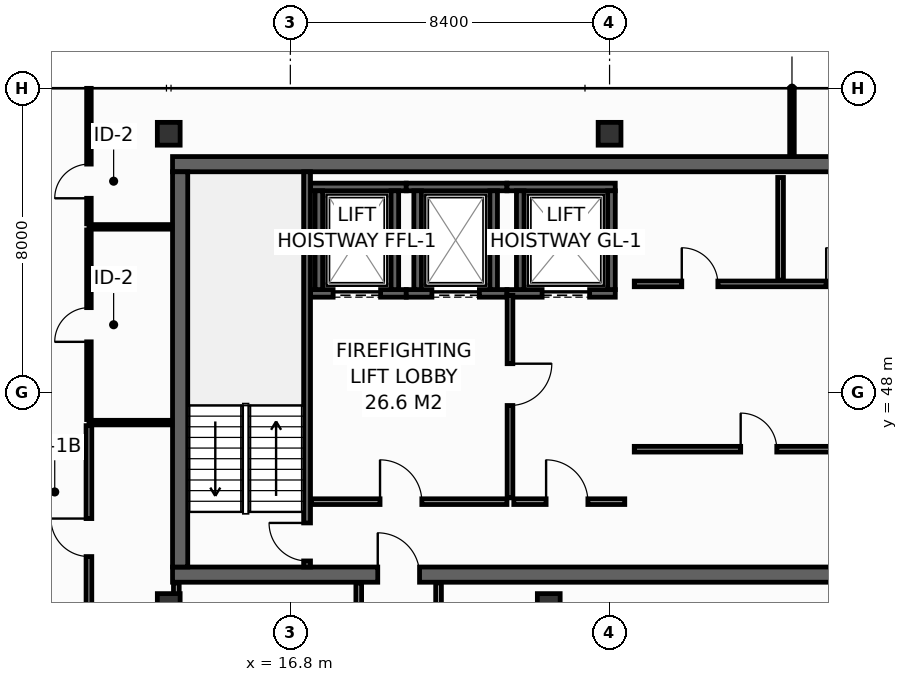
"""IFC4 building model, lengths in metres.
Left out: names, types, materials, properties, quantities, classifications, styles, units other than length and angle.
Written with IfcOpenShell. Run it as: python <this file> out.ifc"""

import sys

from ifc_helpers import new_model, si_unit, direction, frame, frame_2d, origin, origin_2d, place, context, subcontext, project, spatial, rectangle, hollow_rectangle, extrude, element, fill, save


model = new_model("IFC4")
c1 = context("Model", 3, precision=1e-05, world=origin(), true_north=direction((0.0, 1.0)))
c2 = subcontext(c1, "Body", "Model", "MODEL_VIEW")
j1 = project(units=[si_unit("LENGTHUNIT", "METRE"), si_unit("PLANEANGLEUNIT", "RADIAN")], contexts=[c1])
p1 = place(None, origin())
s1 = spatial("IfcSite", under=j1, at=p1, CompositionType="ELEMENT")
p2 = place(p1, origin())
s2 = spatial("IfcBuilding", under=s1, at=p2, CompositionType="ELEMENT")
p3 = place(p2, frame((0.0, 0.0, 287.6)))
s3 = spatial("IfcBuildingStorey", under=s2, at=p3, CompositionType="ELEMENT", Elevation=287.6)
p4 = place(p3, frame((13.7, 43.2, 0.0), z_axis=(0.0, 0.0, 1.0), x_axis=(1.0, 0.0, 0.0)))
e1 = element("IfcWall", 1, at=p4, inside=s3, PredefinedType="SHEAR", context=c2, shape_type="SweptSolid", body=[
    extrude(rectangle(XDim=32.5, YDim=0.4, at=frame_2d((16.25, 0.0))), origin(), (0.0, 0.0, 1.0), 3.55),
])
p5 = place(p4, frame((5.4, 0.0, 0.0)))
e2 = element("IfcOpeningElement", 2, at=p5, cuts=e1, PredefinedType="OPENING", context=c2, shape_type="SweptSolid", body=[
    extrude(rectangle(XDim=1.1, YDim=2.15, at=frame_2d((0.55, 1.075))), frame((0.0, 0.21, 0.0), z_axis=(0.0, -1.0, 0.0), x_axis=(1.0, 0.0, 0.0)), (0.0, 0.0, 1.0), 0.42),
])
p6 = place(p4, frame((25.6, 0.0, 0.0)))
e3 = element("IfcOpeningElement", 3, at=p6, cuts=e1, PredefinedType="OPENING", context=c2, shape_type="SweptSolid", body=[
    extrude(rectangle(XDim=1.1, YDim=2.15, at=frame_2d((0.55, 1.075))), frame((0.0, 0.21, 0.0), z_axis=(0.0, -1.0, 0.0), x_axis=(1.0, 0.0, 0.0)), (0.0, 0.0, 1.0), 0.42),
])
p7 = place(p3, frame((13.7, 54.0, 0.0), z_axis=(0.0, 0.0, 1.0), x_axis=(1.0, 0.0, 0.0)))
e4 = element("IfcWall", 4, at=p7, inside=s3, PredefinedType="SHEAR", context=c2, shape_type="SweptSolid", body=[
    extrude(rectangle(XDim=32.5, YDim=0.4, at=frame_2d((16.25, 0.0))), origin(), (0.0, 0.0, 1.0), 3.55),
])
p8 = place(p3, frame((13.9, 43.4, 0.0), z_axis=(0.0, 0.0, 1.0), x_axis=(0.0, 1.0, 0.0)))
e5 = element("IfcWall", 5, at=p8, inside=s3, PredefinedType="SHEAR", context=c2, shape_type="SweptSolid", body=[
    extrude(rectangle(XDim=10.4, YDim=0.4, at=frame_2d((5.2, 0.0))), origin(), (0.0, 0.0, 1.0), 3.55),
])
for number, where, z_axis, x_axis in (
    (6, (13.6, 54.8, 0.0), (0.0, 0.0, 1.0), (1.0, 0.0, 0.0)),
    (7, (25.2, 54.8, 0.0), (0.0, 0.0, 1.0), (1.0, 0.0, 0.0)),
    (8, (13.6, 42.4, 0.0), (0.0, 0.0, 1.0), (1.0, 0.0, 0.0)),
    (9, (23.6, 42.4, 0.0), (0.0, 0.0, 1.0), (1.0, 0.0, 0.0)),
):
    element("IfcColumn", number, at=place(p3, frame(where, z_axis=z_axis, x_axis=x_axis)), inside=s3, PredefinedType="COLUMN", context=c2, shape_type="SweptSolid", body=[
        extrude(hollow_rectangle(XDim=0.6, YDim=0.6, WallThickness=0.028, at=origin_2d()), origin(), (0.0, 0.0, 1.0), 3.8),
    ])
p9 = place(p3, frame((17.33, 50.6, 0.0), z_axis=(0.0, 0.0, 1.0), x_axis=(1.0, 0.0, 0.0)))
e10 = element("IfcWall", 10, at=p9, inside=s3, PredefinedType="SHEAR", context=c2, shape_type="SweptSolid", body=[
    extrude(rectangle(XDim=2.52, YDim=0.2, at=frame_2d((1.26, 0.0))), origin(), (0.0, 0.0, 1.0), 3.55),
])
p10 = place(p9, frame((0.595, 0.0, 0.0)))
e11 = element("IfcOpeningElement", 11, at=p10, cuts=e10, PredefinedType="OPENING", context=c2, shape_type="SweptSolid", body=[
    extrude(rectangle(XDim=1.25, YDim=2.3, at=frame_2d((0.625, 1.15))), frame((0.0, 0.11, 0.0), z_axis=(0.0, -1.0, 0.0), x_axis=(1.0, 0.0, 0.0)), (0.0, 0.0, 1.0), 0.22),
])
p11 = place(p3, frame((17.33, 53.4, 0.0), z_axis=(0.0, 0.0, 1.0), x_axis=(1.0, 0.0, 0.0)))
e12 = element("IfcWall", 12, at=p11, inside=s3, PredefinedType="SHEAR", context=c2, shape_type="SweptSolid", body=[
    extrude(rectangle(XDim=2.52, YDim=0.2, at=frame_2d((1.26, 0.0))), origin(), (0.0, 0.0, 1.0), 3.55),
])
for number, where, z_axis, x_axis in (
    (13, (17.55, 50.7, 0.0), (0.0, 0.0, 1.0), (0.0, 1.0, 0.0)),
    (14, (19.55, 50.7, 0.0), (0.0, 0.0, 1.0), (0.0, 1.0, 0.0)),
):
    element("IfcWall", number, at=place(p3, frame(where, z_axis=z_axis, x_axis=x_axis)), inside=s3, PredefinedType="SHEAR", context=c2, shape_type="SweptSolid", body=[
        extrude(rectangle(XDim=2.6, YDim=0.2, at=frame_2d((1.3, 0.0))), origin(), (0.0, 0.0, 1.0), 3.55),
    ])
p12 = place(p3, frame((19.85, 50.6, 0.0), z_axis=(0.0, 0.0, 1.0), x_axis=(1.0, 0.0, 0.0)))
e15 = element("IfcWall", 15, at=p12, inside=s3, PredefinedType="SHEAR", context=c2, shape_type="SweptSolid", body=[
    extrude(rectangle(XDim=2.65, YDim=0.2, at=frame_2d((1.325, 0.0))), origin(), (0.0, 0.0, 1.0), 3.55),
])
p13 = place(p12, frame((0.675, 0.0, 0.0)))
e16 = element("IfcOpeningElement", 16, at=p13, cuts=e15, PredefinedType="OPENING", context=c2, shape_type="SweptSolid", body=[
    extrude(rectangle(XDim=1.25, YDim=2.3, at=frame_2d((0.625, 1.15))), frame((0.0, 0.11, 0.0), z_axis=(0.0, -1.0, 0.0), x_axis=(1.0, 0.0, 0.0)), (0.0, 0.0, 1.0), 0.22),
])
p14 = place(p3, frame((19.85, 53.4, 0.0), z_axis=(0.0, 0.0, 1.0), x_axis=(1.0, 0.0, 0.0)))
e17 = element("IfcWall", 17, at=p14, inside=s3, PredefinedType="SHEAR", context=c2, shape_type="SweptSolid", body=[
    extrude(rectangle(XDim=2.65, YDim=0.2, at=frame_2d((1.325, 0.0))), origin(), (0.0, 0.0, 1.0), 3.55),
])
for number, where, z_axis, x_axis in (
    (18, (20.15, 50.7, 0.0), (0.0, 0.0, 1.0), (0.0, 1.0, 0.0)),
    (19, (22.15, 50.7, 0.0), (0.0, 0.0, 1.0), (0.0, 1.0, 0.0)),
):
    element("IfcWall", number, at=place(p3, frame(where, z_axis=z_axis, x_axis=x_axis)), inside=s3, PredefinedType="SHEAR", context=c2, shape_type="SweptSolid", body=[
        extrude(rectangle(XDim=2.6, YDim=0.2, at=frame_2d((1.3, 0.0))), origin(), (0.0, 0.0, 1.0), 3.55),
    ])
p15 = place(p3, frame((22.5, 50.6, 0.0), z_axis=(0.0, 0.0, 1.0), x_axis=(1.0, 0.0, 0.0)))
e20 = element("IfcWall", 20, at=p15, inside=s3, PredefinedType="SHEAR", context=c2, shape_type="SweptSolid", body=[
    extrude(rectangle(XDim=2.85, YDim=0.2, at=frame_2d((1.425, 0.0))), origin(), (0.0, 0.0, 1.0), 3.55),
])
p16 = place(p15, frame((0.925, 0.0, 0.0)))
e21 = element("IfcOpeningElement", 21, at=p16, cuts=e20, PredefinedType="OPENING", context=c2, shape_type="SweptSolid", body=[
    extrude(rectangle(XDim=1.25, YDim=2.3, at=frame_2d((0.625, 1.15))), frame((0.0, 0.11, 0.0), z_axis=(0.0, -1.0, 0.0), x_axis=(1.0, 0.0, 0.0)), (0.0, 0.0, 1.0), 0.22),
])
p17 = place(p3, frame((22.5, 53.4, 0.0), z_axis=(0.0, 0.0, 1.0), x_axis=(1.0, 0.0, 0.0)))
e22 = element("IfcWall", 22, at=p17, inside=s3, PredefinedType="SHEAR", context=c2, shape_type="SweptSolid", body=[
    extrude(rectangle(XDim=2.85, YDim=0.2, at=frame_2d((1.425, 0.0))), origin(), (0.0, 0.0, 1.0), 3.55),
])
for number, where, z_axis, x_axis in (
    (23, (22.85, 50.7, 0.0), (0.0, 0.0, 1.0), (0.0, 1.0, 0.0)),
    (24, (25.25, 50.7, 0.0), (0.0, 0.0, 1.0), (0.0, 1.0, 0.0)),
):
    element("IfcWall", number, at=place(p3, frame(where, z_axis=z_axis, x_axis=x_axis)), inside=s3, PredefinedType="SHEAR", context=c2, shape_type="SweptSolid", body=[
        extrude(rectangle(XDim=2.6, YDim=0.2, at=frame_2d((1.3, 0.0))), origin(), (0.0, 0.0, 1.0), 3.55),
    ])
p18 = place(p3, frame((17.24, 43.4, 0.0), z_axis=(0.0, 0.0, 1.0), x_axis=(0.0, 1.0, 0.0)))
e25 = element("IfcWall", 25, at=p18, inside=s3, PredefinedType="SHEAR", context=c2, shape_type="SweptSolid", body=[
    extrude(rectangle(XDim=10.4, YDim=0.18, at=frame_2d((5.2, 0.0))), origin(), (0.0, 0.0, 1.0), 3.55),
])
p19 = place(p18, frame((0.16, 0.0, 0.0)))
e26 = element("IfcOpeningElement", 26, at=p19, cuts=e25, PredefinedType="OPENING", context=c2, shape_type="SweptSolid", body=[
    extrude(rectangle(XDim=1.0, YDim=2.15, at=frame_2d((0.5, 1.075))), frame((0.0, 0.1, 0.0), z_axis=(0.0, -1.0, 0.0), x_axis=(1.0, 0.0, 0.0)), (0.0, 0.0, 1.0), 0.2),
])
p20 = place(p3, frame((17.36, 45.12, 0.0), z_axis=(0.0, 0.0, 1.0), x_axis=(1.0, 0.0, 0.0)))
e27 = element("IfcWall", 27, at=p20, inside=s3, PredefinedType="PARTITIONING", context=c2, shape_type="SweptSolid", body=[
    extrude(rectangle(XDim=5.14, YDim=0.15, at=frame_2d((2.57, 0.0))), origin(), (0.0, 0.0, 1.0), 3.55),
])
p21 = place(p20, frame((1.8, 0.0, 0.0)))
e28 = element("IfcOpeningElement", 28, at=p21, cuts=e27, PredefinedType="OPENING", context=c2, shape_type="SweptSolid", body=[
    extrude(rectangle(XDim=1.1, YDim=2.15, at=frame_2d((0.55, 1.075))), frame((0.0, 0.085, 0.0), z_axis=(0.0, -1.0, 0.0), x_axis=(1.0, 0.0, 0.0)), (0.0, 0.0, 1.0), 0.17),
])
p22 = place(p3, frame((22.58, 50.55, 0.0), z_axis=(0.0, 0.0, 1.0), x_axis=(0.0, -1.0, 0.0)))
e29 = element("IfcWall", 29, at=p22, inside=s3, PredefinedType="PARTITIONING", context=c2, shape_type="SweptSolid", body=[
    extrude(rectangle(XDim=5.33, YDim=0.15, at=frame_2d((2.665, 0.0))), origin(), (0.0, 0.0, 1.0), 3.55),
])
p23 = place(p22, frame((1.8, 0.0, 0.0)))
e30 = element("IfcOpeningElement", 30, at=p23, cuts=e29, PredefinedType="OPENING", context=c2, shape_type="SweptSolid", body=[
    extrude(rectangle(XDim=1.1, YDim=2.15, at=frame_2d((0.55, 1.075))), frame((0.0, 0.085, 0.0), z_axis=(0.0, -1.0, 0.0), x_axis=(1.0, 0.0, 0.0)), (0.0, 0.0, 1.0), 0.17),
])
p24 = place(p3, frame((22.68, 45.12, 0.0), z_axis=(0.0, 0.0, 1.0), x_axis=(1.0, 0.0, 0.0)))
e31 = element("IfcWall", 31, at=p24, inside=s3, PredefinedType="PARTITIONING", context=c2, shape_type="SweptSolid", body=[
    extrude(rectangle(XDim=2.92, YDim=0.15, at=frame_2d((1.46, 0.0))), origin(), (0.0, 0.0, 1.0), 3.55),
])
p25 = place(p24, frame((0.85, 0.0, 0.0)))
e32 = element("IfcOpeningElement", 32, at=p25, cuts=e31, PredefinedType="OPENING", context=c2, shape_type="SweptSolid", body=[
    extrude(rectangle(XDim=1.1, YDim=2.15, at=frame_2d((0.55, 1.075))), frame((0.0, 0.085, 0.0), z_axis=(0.0, -1.0, 0.0), x_axis=(1.0, 0.0, 0.0)), (0.0, 0.0, 1.0), 0.17),
])
p26 = place(p3, frame((25.85, 50.85, 0.0), z_axis=(0.0, 0.0, 1.0), x_axis=(1.0, 0.0, 0.0)))
e33 = element("IfcWall", 33, at=p26, inside=s3, PredefinedType="PARTITIONING", context=c2, shape_type="SweptSolid", body=[
    extrude(rectangle(XDim=7.65, YDim=0.15, at=frame_2d((3.825, 0.0))), origin(), (0.0, 0.0, 1.0), 3.55),
])
p27 = place(p26, frame((1.25, 0.0, 0.0)))
e34 = element("IfcOpeningElement", 34, at=p27, cuts=e33, PredefinedType="OPENING", context=c2, shape_type="SweptSolid", body=[
    extrude(rectangle(XDim=0.95, YDim=2.15, at=frame_2d((0.475, 1.075))), frame((0.0, 0.085, 0.0), z_axis=(0.0, -1.0, 0.0), x_axis=(1.0, 0.0, 0.0)), (0.0, 0.0, 1.0), 0.17),
])
p28 = place(p26, frame((5.05, 0.0, 0.0)))
e35 = element("IfcOpeningElement", 35, at=p28, cuts=e33, PredefinedType="OPENING", context=c2, shape_type="SweptSolid", body=[
    extrude(rectangle(XDim=0.95, YDim=2.15, at=frame_2d((0.475, 1.075))), frame((0.0, 0.085, 0.0), z_axis=(0.0, -1.0, 0.0), x_axis=(1.0, 0.0, 0.0)), (0.0, 0.0, 1.0), 0.17),
])
p29 = place(p3, frame((29.7, 50.95, 0.0), z_axis=(0.0, 0.0, 1.0), x_axis=(0.0, 1.0, 0.0)))
e36 = element("IfcWall", 36, at=p29, inside=s3, PredefinedType="PARTITIONING", context=c2, shape_type="SweptSolid", body=[
    extrude(rectangle(XDim=2.7, YDim=0.15, at=frame_2d((1.35, 0.0))), origin(), (0.0, 0.0, 1.0), 3.55),
])
p30 = place(p3, frame((25.85, 46.5, 0.0), z_axis=(0.0, 0.0, 1.0), x_axis=(1.0, 0.0, 0.0)))
e37 = element("IfcWall", 37, at=p30, inside=s3, PredefinedType="PARTITIONING", context=c2, shape_type="SweptSolid", body=[
    extrude(rectangle(XDim=7.65, YDim=0.15, at=frame_2d((3.825, 0.0))), origin(), (0.0, 0.0, 1.0), 3.55),
])
p31 = place(p30, frame((2.8, 0.0, 0.0)))
e38 = element("IfcOpeningElement", 38, at=p31, cuts=e37, PredefinedType="OPENING", context=c2, shape_type="SweptSolid", body=[
    extrude(rectangle(XDim=0.95, YDim=2.15, at=frame_2d((0.475, 1.075))), frame((0.0, 0.085, 0.0), z_axis=(0.0, -1.0, 0.0), x_axis=(1.0, 0.0, 0.0)), (0.0, 0.0, 1.0), 0.17),
])
p32 = place(p3, frame((11.5, 52.35, 0.0), z_axis=(0.0, 0.0, 1.0), x_axis=(1.0, 0.0, 0.0)))
e39 = element("IfcWall", 39, at=p32, inside=s3, PredefinedType="PARTITIONING", context=c2, shape_type="SweptSolid", body=[
    extrude(rectangle(XDim=2.18, YDim=0.12, at=frame_2d((1.09, 0.0))), origin(), (0.0, 0.0, 1.0), 3.55),
])
p33 = place(p3, frame((30.0, 54.22, 0.0), z_axis=(0.0, 0.0, 1.0), x_axis=(0.0, 1.0, 0.0)))
e40 = element("IfcWall", 40, at=p33, inside=s3, PredefinedType="PARTITIONING", context=c2, shape_type="SweptSolid", body=[
    extrude(rectangle(XDim=1.775, YDim=0.12, at=frame_2d((0.888, 0.0))), origin(), (0.0, 0.0, 1.0), 2.935),
])
p34 = place(p3, frame((11.5, 52.43, 0.0), z_axis=(0.0, 0.0, 1.0), x_axis=(0.0, 1.0, 0.0)))
e41 = element("IfcWall", 41, at=p34, inside=s3, PredefinedType="PARTITIONING", context=c2, shape_type="SweptSolid", body=[
    extrude(rectangle(XDim=3.565, YDim=0.12, at=frame_2d((1.783, 0.0))), origin(), (0.0, 0.0, 1.0), 2.935),
])
p35 = place(p34, frame((0.672, 0.0, 0.0)))
e42 = element("IfcOpeningElement", 42, at=p35, cuts=e41, PredefinedType="OPENING", context=c2, shape_type="SweptSolid", body=[
    extrude(rectangle(XDim=0.9, YDim=2.1, at=frame_2d((0.45, 1.05))), frame((0.0, 0.07, 0.0), z_axis=(0.0, -1.0, 0.0), x_axis=(1.0, 0.0, 0.0)), (0.0, 0.0, 1.0), 0.14),
])
p36 = place(p3, frame((11.5, 47.2, 0.0), z_axis=(0.0, 0.0, 1.0), x_axis=(1.0, 0.0, 0.0)))
e43 = element("IfcWall", 43, at=p36, inside=s3, PredefinedType="PARTITIONING", context=c2, shape_type="SweptSolid", body=[
    extrude(rectangle(XDim=2.18, YDim=0.12, at=frame_2d((1.09, 0.0))), origin(), (0.0, 0.0, 1.0), 3.55),
])
p37 = place(p3, frame((11.5, 41.23, 0.0), z_axis=(0.0, 0.0, 1.0), x_axis=(0.0, 1.0, 0.0)))
e44 = element("IfcWall", 44, at=p37, inside=s3, PredefinedType="PARTITIONING", context=c2, shape_type="SweptSolid", body=[
    extrude(rectangle(XDim=5.89, YDim=0.15, at=frame_2d((2.945, 0.0))), origin(), (0.0, 0.0, 1.0), 2.947),
])
p38 = place(p37, frame((2.445, 0.0, 0.0)))
e45 = element("IfcOpeningElement", 45, at=p38, cuts=e44, PredefinedType="OPENING", context=c2, shape_type="SweptSolid", body=[
    extrude(rectangle(XDim=1.0, YDim=2.15, at=frame_2d((0.5, 1.075))), frame((0.0, 0.085, 0.0), z_axis=(0.0, -1.0, 0.0), x_axis=(1.0, 0.0, 0.0)), (0.0, 0.0, 1.0), 0.17),
])
p39 = place(p3, frame((11.5, 47.28, 0.0), z_axis=(0.0, 0.0, 1.0), x_axis=(0.0, 1.0, 0.0)))
e46 = element("IfcWall", 46, at=p39, inside=s3, PredefinedType="PARTITIONING", context=c2, shape_type="SweptSolid", body=[
    extrude(rectangle(XDim=4.99, YDim=0.12, at=frame_2d((2.495, 0.0))), origin(), (0.0, 0.0, 1.0), 3.55),
])
p40 = place(p39, frame((2.045, 0.0, 0.0)))
e47 = element("IfcOpeningElement", 47, at=p40, cuts=e46, PredefinedType="OPENING", context=c2, shape_type="SweptSolid", body=[
    extrude(rectangle(XDim=0.9, YDim=2.1, at=frame_2d((0.45, 1.05))), frame((0.0, 0.07, 0.0), z_axis=(0.0, -1.0, 0.0), x_axis=(1.0, 0.0, 0.0)), (0.0, 0.0, 1.0), 0.14),
])
p41 = place(p3, frame((13.8, 41.23, 0.0), z_axis=(0.0, 0.0, 1.0), x_axis=(0.0, 1.0, 0.0)))
e48 = element("IfcWall", 48, at=p41, inside=s3, PredefinedType="PARTITIONING", context=c2, shape_type="SweptSolid", body=[
    extrude(rectangle(XDim=1.75, YDim=0.15, at=frame_2d((0.875, 0.0))), origin(), (0.0, 0.0, 1.0), 3.55),
])
for number, where, z_axis, x_axis in (
    (49, (18.6, 41.15, 0.0), (0.0, 0.0, 1.0), (0.0, 1.0, 0.0)),
    (50, (20.7, 41.15, 0.0), (0.0, 0.0, 1.0), (0.0, 1.0, 0.0)),
):
    element("IfcWall", number, at=place(p3, frame(where, z_axis=z_axis, x_axis=x_axis)), inside=s3, PredefinedType="PARTITIONING", context=c2, shape_type="SweptSolid", body=[
        extrude(rectangle(XDim=1.83, YDim=0.15, at=frame_2d((0.915, 0.0))), origin(), (0.0, 0.0, 1.0), 3.55),
    ])
p42 = place(p10, origin())
e51 = element("IfcDoor", 51, at=p42, inside=s3, OperationType="SLIDING_TO_LEFT", PredefinedType="DOOR", context=c2, shape_type="SweptSolid", body=[
    extrude(rectangle(XDim=1.25, YDim=2.3, at=frame_2d((0.625, 1.15))), frame((0.0, 0.025, 0.0), z_axis=(0.0, -1.0, 0.0), x_axis=(1.0, 0.0, 0.0)), (0.0, 0.0, 1.0), 0.05),
])
fill(e11, e51)
p43 = place(p13, origin())
e52 = element("IfcDoor", 52, at=p43, inside=s3, OperationType="SLIDING_TO_LEFT", PredefinedType="DOOR", context=c2, shape_type="SweptSolid", body=[
    extrude(rectangle(XDim=1.25, YDim=2.3, at=frame_2d((0.625, 1.15))), frame((0.0, 0.025, 0.0), z_axis=(0.0, -1.0, 0.0), x_axis=(1.0, 0.0, 0.0)), (0.0, 0.0, 1.0), 0.05),
])
fill(e16, e52)
p44 = place(p16, origin())
e53 = element("IfcDoor", 53, at=p44, inside=s3, OperationType="SLIDING_TO_LEFT", PredefinedType="DOOR", context=c2, shape_type="SweptSolid", body=[
    extrude(rectangle(XDim=1.25, YDim=2.3, at=frame_2d((0.625, 1.15))), frame((0.0, 0.025, 0.0), z_axis=(0.0, -1.0, 0.0), x_axis=(1.0, 0.0, 0.0)), (0.0, 0.0, 1.0), 0.05),
])
fill(e21, e53)
p45 = place(p19, origin())
e54 = element("IfcDoor", 54, at=p45, inside=s3, OperationType="SINGLE_SWING_RIGHT", PredefinedType="DOOR", context=c2, shape_type="SweptSolid", body=[
    extrude(rectangle(XDim=1.0, YDim=2.15, at=frame_2d((0.5, 1.075))), frame((0.0, 0.025, 0.0), z_axis=(0.0, -1.0, 0.0), x_axis=(1.0, 0.0, 0.0)), (0.0, 0.0, 1.0), 0.05),
])
fill(e26, e54)
p46 = place(p21, origin())
e55 = element("IfcDoor", 55, at=p46, inside=s3, OperationType="SINGLE_SWING_LEFT", PredefinedType="DOOR", context=c2, shape_type="SweptSolid", body=[
    extrude(rectangle(XDim=1.1, YDim=2.15, at=frame_2d((0.55, 1.075))), frame((0.0, 0.025, 0.0), z_axis=(0.0, -1.0, 0.0), x_axis=(1.0, 0.0, 0.0)), (0.0, 0.0, 1.0), 0.05),
])
fill(e28, e55)
p47 = place(p23, origin())
e56 = element("IfcDoor", 56, at=p47, inside=s3, OperationType="SINGLE_SWING_LEFT", PredefinedType="DOOR", context=c2, shape_type="SweptSolid", body=[
    extrude(rectangle(XDim=1.1, YDim=2.15, at=frame_2d((0.55, 1.075))), frame((0.0, 0.025, 0.0), z_axis=(0.0, -1.0, 0.0), x_axis=(1.0, 0.0, 0.0)), (0.0, 0.0, 1.0), 0.05),
])
fill(e30, e56)
p48 = place(p25, origin())
e57 = element("IfcDoor", 57, at=p48, inside=s3, OperationType="SINGLE_SWING_LEFT", PredefinedType="DOOR", context=c2, shape_type="SweptSolid", body=[
    extrude(rectangle(XDim=1.1, YDim=2.15, at=frame_2d((0.55, 1.075))), frame((0.0, 0.025, 0.0), z_axis=(0.0, -1.0, 0.0), x_axis=(1.0, 0.0, 0.0)), (0.0, 0.0, 1.0), 0.05),
])
fill(e32, e57)
p49 = place(p5, origin())
e58 = element("IfcDoor", 58, at=p49, inside=s3, OperationType="SINGLE_SWING_LEFT", PredefinedType="DOOR", context=c2, shape_type="SweptSolid", body=[
    extrude(rectangle(XDim=1.1, YDim=2.15, at=frame_2d((0.55, 1.075))), frame((0.0, 0.025, 0.0), z_axis=(0.0, -1.0, 0.0), x_axis=(1.0, 0.0, 0.0)), (0.0, 0.0, 1.0), 0.05),
])
fill(e2, e58)
p50 = place(p27, origin())
e59 = element("IfcDoor", 59, at=p50, inside=s3, OperationType="SINGLE_SWING_LEFT", PredefinedType="DOOR", context=c2, shape_type="SweptSolid", body=[
    extrude(rectangle(XDim=0.95, YDim=2.15, at=frame_2d((0.475, 1.075))), frame((0.0, 0.025, 0.0), z_axis=(0.0, -1.0, 0.0), x_axis=(1.0, 0.0, 0.0)), (0.0, 0.0, 1.0), 0.05),
])
fill(e34, e59)
p51 = place(p28, origin())
e60 = element("IfcDoor", 60, at=p51, inside=s3, OperationType="SINGLE_SWING_LEFT", PredefinedType="DOOR", context=c2, shape_type="SweptSolid", body=[
    extrude(rectangle(XDim=0.95, YDim=2.15, at=frame_2d((0.475, 1.075))), frame((0.0, 0.025, 0.0), z_axis=(0.0, -1.0, 0.0), x_axis=(1.0, 0.0, 0.0)), (0.0, 0.0, 1.0), 0.05),
])
fill(e35, e60)
p52 = place(p31, origin())
e61 = element("IfcDoor", 61, at=p52, inside=s3, OperationType="SINGLE_SWING_LEFT", PredefinedType="DOOR", context=c2, shape_type="SweptSolid", body=[
    extrude(rectangle(XDim=0.95, YDim=2.15, at=frame_2d((0.475, 1.075))), frame((0.0, 0.025, 0.0), z_axis=(0.0, -1.0, 0.0), x_axis=(1.0, 0.0, 0.0)), (0.0, 0.0, 1.0), 0.05),
])
fill(e38, e61)
p53 = place(p35, origin())
e62 = element("IfcDoor", 62, at=p53, inside=s3, OperationType="SINGLE_SWING_LEFT", PredefinedType="DOOR", context=c2, shape_type="SweptSolid", body=[
    extrude(rectangle(XDim=0.9, YDim=2.1, at=frame_2d((0.45, 1.05))), frame((0.0, 0.025, 0.0), z_axis=(0.0, -1.0, 0.0), x_axis=(1.0, 0.0, 0.0)), (0.0, 0.0, 1.0), 0.05),
])
fill(e42, e62)
p54 = place(p38, origin())
e63 = element("IfcDoor", 63, at=p54, inside=s3, OperationType="SINGLE_SWING_RIGHT", PredefinedType="DOOR", context=c2, shape_type="SweptSolid", body=[
    extrude(rectangle(XDim=1.0, YDim=2.15, at=frame_2d((0.5, 1.075))), frame((0.0, 0.025, 0.0), z_axis=(0.0, -1.0, 0.0), x_axis=(1.0, 0.0, 0.0)), (0.0, 0.0, 1.0), 0.05),
])
fill(e45, e63)
p55 = place(p40, origin())
e64 = element("IfcDoor", 64, at=p55, inside=s3, OperationType="SINGLE_SWING_LEFT", PredefinedType="DOOR", context=c2, shape_type="SweptSolid", body=[
    extrude(rectangle(XDim=0.9, YDim=2.1, at=frame_2d((0.45, 1.05))), frame((0.0, 0.025, 0.0), z_axis=(0.0, -1.0, 0.0), x_axis=(1.0, 0.0, 0.0)), (0.0, 0.0, 1.0), 0.05),
])
fill(e47, e64)
save(model, sys.argv[1])
